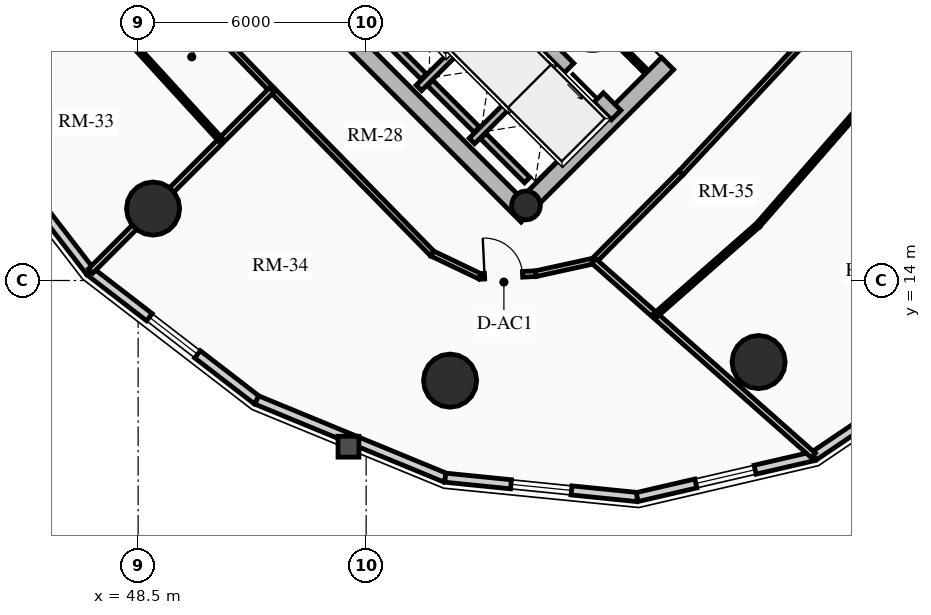
"""IFC4 building model, lengths in metres.
Left out: names, types, materials, properties, quantities, classifications, styles, units other than length and angle.
Written with IfcOpenShell. Run it as: python <this file> out.ifc"""

import sys

from ifc_helpers import new_model, si_unit, direction, frame, frame_2d, origin, origin_2d, place, context, subcontext, project, spatial, rectangle, circle, hollow_circle, extrude, source, transform, mapped, element, fill, save


model = new_model("IFC4")
c1 = context("Model", 3, precision=1e-05, world=origin(), true_north=direction((0.0, 1.0)))
c2 = subcontext(c1, "Body", "Model", "MODEL_VIEW")
j1 = project(units=[si_unit("LENGTHUNIT", "METRE"), si_unit("PLANEANGLEUNIT", "RADIAN")], contexts=[c1])
p1 = place(None, origin())
s1 = spatial("IfcSite", under=j1, at=p1, CompositionType="ELEMENT")
p2 = place(p1, origin())
s2 = spatial("IfcBuilding", under=s1, at=p2, CompositionType="ELEMENT")
p3 = place(p2, frame((0.0, 0.0, 144.04)))
s3 = spatial("IfcBuildingStorey", under=s2, at=p3, CompositionType="ELEMENT", Elevation=144.04)
p4 = place(p3, frame((58.737, 15.697, 0.0), z_axis=(0.0, 0.0, 1.0), x_axis=(-0.707106781187, 0.707106781187, 0.0)))
e1 = element("IfcWall", 1, at=p4, inside=s3, PredefinedType="SHEAR", context=c2, shape_type="SweptSolid", body=[
    extrude(rectangle(XDim=14.2, YDim=0.45, at=frame_2d((7.1, 0.0))), origin(), (0.0, 0.0, 1.0), 3.06),
])
p5 = place(p3, frame((58.578, 15.856, 0.0), z_axis=(0.0, 0.0, 1.0), x_axis=(0.707106781187, 0.707106781187, 0.0)))
e2 = element("IfcWall", 2, at=p5, inside=s3, PredefinedType="SHEAR", context=c2, shape_type="SweptSolid", body=[
    extrude(rectangle(XDim=10.7, YDim=0.45, at=frame_2d((5.35, 0.0))), origin(), (0.0, 0.0, 1.0), 3.06),
])
m1 = source(origin(), c2, "Body", "SweptSolid", [
    extrude(rectangle(XDim=1.5, YDim=2.02, at=frame_2d((0.75, 1.01))), frame((0.0, 0.235, 0.0), z_axis=(0.0, -1.0, 0.0), x_axis=(1.0, 0.0, 0.0)), (0.0, 0.0, 1.0), 0.47),
])
p6 = place(p5, frame((5.45, 0.0, 0.0)))
e3 = element("IfcOpeningElement", 3, at=p6, cuts=e2, PredefinedType="OPENING", context=c2, shape_type="MappedRepresentation", body=[
    mapped(m1, transform((0.0, 0.0, 0.0), x_axis=(1.0, 0.0, 0.0), y_axis=(0.0, 1.0, 0.0), z_axis=(0.0, 0.0, 1.0), scale=1.0)),
])
p7 = place(p3, frame((61.078, 18.355, 0.0), z_axis=(0.0, 0.0, 1.0), x_axis=(-0.707106781187, 0.707106781187, 0.0)))
e4 = element("IfcWall", 4, at=p7, inside=s3, PredefinedType="SHEAR", context=c2, shape_type="SweptSolid", body=[
    extrude(rectangle(XDim=13.75, YDim=0.35, at=frame_2d((6.875, 0.0))), origin(), (0.0, 0.0, 1.0), 3.06),
])
m2 = source(origin(), c2, "Body", "SweptSolid", [
    extrude(rectangle(XDim=1.1, YDim=2.015, at=frame_2d((0.55, 1.007))), frame((0.0, 0.185, 0.0), z_axis=(0.0, -1.0, 0.0), x_axis=(1.0, 0.0, 0.0)), (0.0, 0.0, 1.0), 0.37),
])
p8 = place(p7, frame((4.875, 0.0, 0.0)))
e5 = element("IfcOpeningElement", 5, at=p8, cuts=e4, PredefinedType="OPENING", context=c2, shape_type="MappedRepresentation", body=[
    mapped(m2, transform((0.0, 0.0, 0.0), x_axis=(1.0, 0.0, 0.0), y_axis=(0.0, 1.0, 0.0), z_axis=(0.0, 0.0, 1.0), scale=1.0)),
])
p9 = place(p7, frame((0.65, 0.0, 0.0)))
e6 = element("IfcOpeningElement", 6, at=p9, cuts=e4, PredefinedType="OPENING", context=c2, shape_type="MappedRepresentation", body=[
    mapped(m2, transform((0.0, 0.0, 0.0), x_axis=(1.0, 0.0, 0.0), y_axis=(0.0, 1.0, 0.0), z_axis=(0.0, 0.0, 1.0), scale=1.0)),
])
p10 = place(p7, frame((2.65, 0.0, 0.0)))
e7 = element("IfcOpeningElement", 7, at=p10, cuts=e4, PredefinedType="OPENING", context=c2, shape_type="MappedRepresentation", body=[
    mapped(m2, transform((0.0, 0.0, 0.0), x_axis=(1.0, 0.0, 0.0), y_axis=(0.0, 1.0, 0.0), z_axis=(0.0, 0.0, 1.0), scale=1.0)),
])
m3 = source(origin(), c2, "Body", "SweptSolid", [
    extrude(rectangle(XDim=1.15, YDim=2.02, at=frame_2d((0.575, 1.01))), frame((0.0, 0.185, 0.0), z_axis=(0.0, -1.0, 0.0), x_axis=(1.0, 0.0, 0.0)), (0.0, 0.0, 1.0), 0.37),
])
p11 = place(p7, frame((7.295, 0.0, 0.0)))
e8 = element("IfcOpeningElement", 8, at=p11, cuts=e4, PredefinedType="OPENING", context=c2, shape_type="MappedRepresentation", body=[
    mapped(m3, transform((0.0, 0.0, 0.0), x_axis=(1.0, 0.0, 0.0), y_axis=(0.0, 1.0, 0.0), z_axis=(0.0, 0.0, 1.0), scale=1.0)),
])
p12 = place(p3, frame((58.706, 15.976, 0.0), z_axis=(0.0, 0.0, 1.0), x_axis=(0.707106781187, 0.707106781187, 0.0)))
e9 = element("IfcColumn", 9, at=p12, inside=s3, PredefinedType="COLUMN", context=c2, shape_type="SweptSolid", body=[
    extrude(hollow_circle(Radius=0.38, WallThickness=0.032, at=origin_2d()), origin(), (0.0, 0.0, 1.0), 3.06),
])
for number, where, z_axis, x_axis in (
    (10, (48.893, 15.893, 0.0), (0.0, 0.0, 1.0), (1.0, 0.0, 0.0)),
    (11, (56.709, 11.365, 0.0), (0.0, 0.0, 1.0), (1.0, 0.0, 0.0)),
    (12, (64.827, 11.854, 0.0), (0.0, 0.0, 1.0), (1.0, 0.0, 0.0)),
):
    element("IfcColumn", number, at=place(p3, frame(where, z_axis=z_axis, x_axis=x_axis)), inside=s3, PredefinedType="USERDEFINED", context=c2, shape_type="SweptSolid", body=[
        extrude(circle(Radius=0.7, at=origin_2d()), origin(), (0.0, 0.0, 1.0), 3.06),
    ])
p13 = place(p3, frame((47.236, 14.236, 0.0), z_axis=(0.0, 0.0, 1.0), x_axis=(-0.610543584779, 0.791982658323, 0.0)))
e13 = element("IfcWall", 13, at=p13, inside=s3, PredefinedType="SOLIDWALL", context=c2, shape_type="SweptSolid", body=[
    extrude(rectangle(XDim=5.537, YDim=0.24, at=frame_2d((2.769, 0.0))), origin(), (0.0, 0.0, 1.0), 2.229),
])
p14 = place(p3, frame((51.622, 10.856, 0.0), z_axis=(0.0, 0.0, 1.0), x_axis=(-0.791982658323, 0.610543584779, 0.0)))
e14 = element("IfcWall", 14, at=p14, inside=s3, PredefinedType="SOLIDWALL", context=c2, shape_type="SweptSolid", body=[
    extrude(rectangle(XDim=5.537, YDim=0.24, at=frame_2d((2.769, 0.0))), origin(), (0.0, 0.0, 1.0), 2.229),
])
m4 = source(origin(), c2, "Body", "SweptSolid", [
    extrude(rectangle(XDim=1.6, YDim=1.3, at=frame_2d((0.8, 0.65))), frame((0.0, 0.13, 0.0), z_axis=(0.0, -1.0, 0.0), x_axis=(1.0, 0.0, 0.0)), (0.0, 0.0, 1.0), 0.26),
])
p15 = place(p14, frame((1.968, 0.0, 0.65)))
e15 = element("IfcOpeningElement", 15, at=p15, cuts=e14, PredefinedType="OPENING", context=c2, shape_type="MappedRepresentation", body=[
    mapped(m4, transform((0.0, 0.0, 0.0), x_axis=(1.0, 0.0, 0.0), y_axis=(0.0, 1.0, 0.0), z_axis=(0.0, 0.0, 1.0), scale=1.0)),
])
p16 = place(p3, frame((56.582, 8.811, 0.0), z_axis=(0.0, 0.0, 1.0), x_axis=(-0.924528197738, 0.38111364655, 0.0)))
e16 = element("IfcWall", 16, at=p16, inside=s3, PredefinedType="SOLIDWALL", context=c2, shape_type="SweptSolid", body=[
    extrude(rectangle(XDim=5.366, YDim=0.24, at=frame_2d((2.683, 0.0))), origin(), (0.0, 0.0, 1.0), 2.229),
])
p17 = place(p3, frame((61.633, 8.302, 0.0), z_axis=(0.0, 0.0, 1.0), x_axis=(-0.994959267396, 0.100279889424, 0.0)))
e17 = element("IfcWall", 17, at=p17, inside=s3, PredefinedType="SOLIDWALL", context=c2, shape_type="SweptSolid", body=[
    extrude(rectangle(XDim=5.076, YDim=0.24, at=frame_2d((2.538, 0.0))), origin(), (0.0, 0.0, 1.0), 2.229),
])
p18 = place(p17, frame((1.738, 0.0, 0.65)))
e18 = element("IfcOpeningElement", 18, at=p18, cuts=e17, PredefinedType="OPENING", context=c2, shape_type="MappedRepresentation", body=[
    mapped(m4, transform((0.0, 0.0, 0.0), x_axis=(1.0, 0.0, 0.0), y_axis=(0.0, 1.0, 0.0), z_axis=(0.0, 0.0, 1.0), scale=1.0)),
])
p19 = place(p3, frame((66.279, 9.378, 0.0), z_axis=(0.0, 0.0, 1.0), x_axis=(-0.974206226622, -0.225659540039, 0.0)))
e19 = element("IfcWall", 19, at=p19, inside=s3, PredefinedType="SOLIDWALL", context=c2, shape_type="SweptSolid", body=[
    extrude(rectangle(XDim=4.769, YDim=0.24, at=frame_2d((2.385, 0.0))), origin(), (0.0, 0.0, 1.0), 2.229),
])
p20 = place(p19, frame((1.585, 0.0, 0.65)))
e20 = element("IfcOpeningElement", 20, at=p20, cuts=e19, PredefinedType="OPENING", context=c2, shape_type="MappedRepresentation", body=[
    mapped(m4, transform((0.0, 0.0, 0.0), x_axis=(1.0, 0.0, 0.0), y_axis=(0.0, 1.0, 0.0), z_axis=(0.0, 0.0, 1.0), scale=1.0)),
])
p21 = place(p3, frame((70.065, 11.935, 0.0), z_axis=(0.0, 0.0, 1.0), x_axis=(-0.828739009952, -0.559635286042, 0.0)))
e21 = element("IfcWall", 21, at=p21, inside=s3, PredefinedType="SOLIDWALL", context=c2, shape_type="SweptSolid", body=[
    extrude(rectangle(XDim=4.569, YDim=0.24, at=frame_2d((2.284, 0.0))), origin(), (0.0, 0.0, 1.0), 2.229),
])
p22 = place(p3, frame((55.888, 19.069, 0.0), z_axis=(0.0, 0.0, 1.0), x_axis=(0.707106781187, 0.707106781187, 0.0)))
e22 = element("IfcWall", 22, at=p22, inside=s3, PredefinedType="SHEAR", context=c2, shape_type="SweptSolid", body=[
    extrude(rectangle(XDim=2.97, YDim=0.2, at=frame_2d((1.485, 0.0))), origin(), (0.0, 0.0, 1.0), 3.06),
])
p23 = place(p3, frame((56.015, 19.366, 0.0), z_axis=(0.0, 0.0, 1.0), x_axis=(-0.707106781187, 0.707106781187, 0.0)))
e23 = element("IfcWall", 23, at=p23, inside=s3, PredefinedType="SHEAR", context=c2, shape_type="SweptSolid", body=[
    extrude(rectangle(XDim=2.44, YDim=0.2, at=frame_2d((1.22, 0.0))), origin(), (0.0, 0.0, 1.0), 3.06),
])
p24 = place(p3, frame((57.284, 17.673, 0.0), z_axis=(0.0, 0.0, 1.0), x_axis=(0.707147878904, 0.70706568108, 0.0)))
e24 = element("IfcWall", 24, at=p24, inside=s3, PredefinedType="SHEAR", context=c2, shape_type="SweptSolid", body=[
    extrude(rectangle(XDim=2.97, YDim=0.2, at=frame_2d((1.485, 0.0))), origin(), (0.0, 0.0, 1.0), 3.06),
])
p25 = place(p3, frame((57.412, 17.97, 0.0), z_axis=(0.0, 0.0, 1.0), x_axis=(-0.707106781187, 0.707106781187, 0.0)))
e25 = element("IfcWall", 25, at=p25, inside=s3, PredefinedType="SHEAR", context=c2, shape_type="SweptSolid", body=[
    extrude(rectangle(XDim=1.735, YDim=0.2, at=frame_2d((0.867, 0.0))), origin(), (0.0, 0.0, 1.0), 3.06),
])
p26 = place(p3, frame((58.737, 16.644, 0.0), z_axis=(0.0, 0.0, 1.0), x_axis=(-0.707032117043, 0.707181437447, 0.0)))
e26 = element("IfcWall", 26, at=p26, inside=s3, PredefinedType="SHEAR", context=c2, shape_type="SweptSolid", body=[
    extrude(rectangle(XDim=1.635, YDim=0.2, at=frame_2d((0.817, 0.0))), origin(), (0.0, 0.0, 1.0), 3.06),
])
p27 = place(p3, frame((61.835, 19.529, 0.0), z_axis=(0.0, 0.0, 1.0), x_axis=(-0.707146413884, 0.707067146267, 0.0)))
e27 = element("IfcWall", 27, at=p27, inside=s3, PredefinedType="PARTITIONING", context=c2, shape_type="SweptSolid", body=[
    extrude(rectangle(XDim=3.08, YDim=0.125, at=frame_2d((1.54, 0.0))), origin(), (0.0, 0.0, 1.0), 2.705),
])
m5 = source(origin(), c2, "Body", "SweptSolid", [
    extrude(rectangle(XDim=0.9, YDim=2.005, at=frame_2d((0.45, 1.002))), frame((0.0, 0.073, 0.0), z_axis=(0.0, -1.0, 0.0), x_axis=(1.0, 0.0, 0.0)), (0.0, 0.0, 1.0), 0.145),
])
p28 = place(p27, frame((1.05, 0.0, 0.0)))
e28 = element("IfcOpeningElement", 28, at=p28, cuts=e27, PredefinedType="OPENING", context=c2, shape_type="MappedRepresentation", body=[
    mapped(m5, transform((0.0, 0.0, 0.0), x_axis=(1.0, 0.0, 0.0), y_axis=(0.0, 1.0, 0.0), z_axis=(0.0, 0.0, 1.0), scale=1.0)),
])
p29 = place(p3, frame((47.901, 23.265, 0.0), z_axis=(0.0, 0.0, 1.0), x_axis=(0.696355965374, -0.717696572019, 0.0)))
e29 = element("IfcWall", 29, at=p29, inside=s3, PredefinedType="PARTITIONING", context=c2, shape_type="SweptSolid", body=[
    extrude(rectangle(XDim=5.915, YDim=0.15, at=frame_2d((2.957, 0.0))), origin(), (0.0, 0.0, 1.0), 2.705),
])
p30 = place(p3, frame((52.02, 19.02, 0.0), z_axis=(0.0, 0.0, 1.0), x_axis=(0.699456449804, -0.71467522332, 0.0)))
e30 = element("IfcWall", 30, at=p30, inside=s3, PredefinedType="PARTITIONING", context=c2, shape_type="SweptSolid", body=[
    extrude(rectangle(XDim=6.032, YDim=0.15, at=frame_2d((3.016, 0.0))), origin(), (0.0, 0.0, 1.0), 2.275),
])
p31 = place(p3, frame((56.239, 14.709, 0.0), z_axis=(0.0, 0.0, 1.0), x_axis=(0.902374219125, -0.430953325383, 0.0)))
e31 = element("IfcWall", 31, at=p31, inside=s3, PredefinedType="PARTITIONING", context=c2, shape_type="SweptSolid", body=[
    extrude(rectangle(XDim=1.394, YDim=0.15, at=frame_2d((0.697, 0.0))), origin(), (0.0, 0.0, 1.0), 2.275),
])
p32 = place(p3, frame((57.497, 14.109, 0.0), z_axis=(0.0, 0.0, 1.0), x_axis=(0.998828286318, 0.048394777109, 0.0)))
e32 = element("IfcWall", 32, at=p32, inside=s3, PredefinedType="PARTITIONING", context=c2, shape_type="SweptSolid", body=[
    extrude(rectangle(XDim=1.468, YDim=0.15, at=frame_2d((0.734, 0.0))), origin(), (0.0, 0.0, 1.0), 2.275),
])
m6 = source(origin(), c2, "Body", "SweptSolid", [
    extrude(rectangle(XDim=1.0, YDim=2.015, at=frame_2d((0.5, 1.007))), frame((0.0, 0.085, 0.0), z_axis=(0.0, -1.0, 0.0), x_axis=(1.0, 0.0, 0.0)), (0.0, 0.0, 1.0), 0.17),
])
p33 = place(p32, frame((0.12, 0.0, 0.0)))
e33 = element("IfcOpeningElement", 33, at=p33, cuts=e32, PredefinedType="OPENING", context=c2, shape_type="MappedRepresentation", body=[
    mapped(m6, transform((0.0, 0.0, 0.0), x_axis=(1.0, 0.0, 0.0), y_axis=(0.0, 1.0, 0.0), z_axis=(0.0, 0.0, 1.0), scale=1.0)),
])
p34 = place(p3, frame((58.963, 14.18, 0.0), z_axis=(0.0, 0.0, 1.0), x_axis=(0.976826524015, 0.214032572243, 0.0)))
e34 = element("IfcWall", 34, at=p34, inside=s3, PredefinedType="PARTITIONING", context=c2, shape_type="SweptSolid", body=[
    extrude(rectangle(XDim=1.562, YDim=0.15, at=frame_2d((0.781, 0.0))), origin(), (0.0, 0.0, 1.0), 2.275),
])
p35 = place(p3, frame((60.488, 14.514, 0.0), z_axis=(0.0, 0.0, 1.0), x_axis=(0.703880260405, 0.71031864611, 0.0)))
e35 = element("IfcWall", 35, at=p35, inside=s3, PredefinedType="PARTITIONING", context=c2, shape_type="SweptSolid", body=[
    extrude(rectangle(XDim=3.261, YDim=0.15, at=frame_2d((1.63, 0.0))), origin(), (0.0, 0.0, 1.0), 2.275),
])
p36 = place(p3, frame((62.784, 16.83, 0.0), z_axis=(0.0, 0.0, 1.0), x_axis=(0.682240832942, 0.731127516831, 0.0)))
e36 = element("IfcWall", 36, at=p36, inside=s3, PredefinedType="PARTITIONING", context=c2, shape_type="SweptSolid", body=[
    extrude(rectangle(XDim=6.517, YDim=0.15, at=frame_2d((3.259, 0.0))), origin(), (0.0, 0.0, 1.0), 2.275),
])
p37 = place(p3, frame((52.02, 19.02, 0.0), z_axis=(0.0, 0.0, 1.0), x_axis=(-0.707106781187, -0.707106781187, 0.0)))
e37 = element("IfcWall", 37, at=p37, inside=s3, PredefinedType="PARTITIONING", context=c2, shape_type="SweptSolid", body=[
    extrude(rectangle(XDim=6.745, YDim=0.16, at=frame_2d((3.373, 0.0))), origin(), (0.0, 0.0, 1.0), 2.229),
])
p38 = place(p3, frame((60.488, 14.514, 0.0), z_axis=(0.0, 0.0, 1.0), x_axis=(0.748740614849, -0.662863101761, 0.0)))
e38 = element("IfcWall", 38, at=p38, inside=s3, PredefinedType="PARTITIONING", context=c2, shape_type="SweptSolid", body=[
    extrude(rectangle(XDim=7.721, YDim=0.16, at=frame_2d((3.861, 0.0))), origin(), (0.0, 0.0, 1.0), 2.229),
])
p39 = place(p3, frame((46.774, 21.967, 0.0), z_axis=(0.0, 0.0, 1.0), x_axis=(0.674324259609, -0.738435368129, 0.0)))
e39 = element("IfcWall", 39, at=p39, inside=s3, PredefinedType="PARTITIONING", context=c2, shape_type="SweptSolid", body=[
    extrude(rectangle(XDim=5.8, YDim=0.125, at=frame_2d((2.9, 0.0))), origin(), (0.0, 0.0, 1.0), 2.705),
])
p40 = place(p3, frame((62.107, 13.081, 0.0), z_axis=(0.0, 0.0, 1.0), x_axis=(0.751158800718, 0.660121546462, 0.0)))
e40 = element("IfcWall", 40, at=p40, inside=s3, PredefinedType="PARTITIONING", context=c2, shape_type="SweptSolid", body=[
    extrude(rectangle(XDim=3.61, YDim=0.125, at=frame_2d((1.805, 0.0))), origin(), (0.0, 0.0, 1.0), 2.275),
])
p41 = place(p3, frame((64.819, 15.464, 0.0), z_axis=(0.0, 0.0, 1.0), x_axis=(0.657357859075, 0.75357855935, 0.0)))
e41 = element("IfcWall", 41, at=p41, inside=s3, PredefinedType="PARTITIONING", context=c2, shape_type="SweptSolid", body=[
    extrude(rectangle(XDim=5.958, YDim=0.125, at=frame_2d((2.979, 0.0))), origin(), (0.0, 0.0, 1.0), 2.275),
])
m7 = source(origin(), c2, "Body", "SweptSolid", [
    extrude(rectangle(XDim=1.6, YDim=1.3, at=frame_2d((0.8, 0.65))), frame((0.0, 0.03, 0.0), z_axis=(0.0, -1.0, 0.0), x_axis=(1.0, 0.0, 0.0)), (0.0, 0.0, 1.0), 0.06),
])
p42 = place(p15, origin())
e42 = element("IfcWindow", 42, at=p42, inside=s3, PartitioningType="SINGLE_PANEL", PredefinedType="WINDOW", context=c2, shape_type="MappedRepresentation", body=[
    mapped(m7, transform((0.0, 0.0, 0.0), x_axis=(1.0, 0.0, 0.0), y_axis=(0.0, 1.0, 0.0), z_axis=(0.0, 0.0, 1.0), scale=1.0)),
])
fill(e15, e42)
p43 = place(p18, origin())
e43 = element("IfcWindow", 43, at=p43, inside=s3, PartitioningType="SINGLE_PANEL", PredefinedType="WINDOW", context=c2, shape_type="MappedRepresentation", body=[
    mapped(m7, transform((0.0, 0.0, 0.0), x_axis=(1.0, 0.0, 0.0), y_axis=(0.0, 1.0, 0.0), z_axis=(0.0, 0.0, 1.0), scale=1.0)),
])
fill(e18, e43)
p44 = place(p20, origin())
e44 = element("IfcWindow", 44, at=p44, inside=s3, PartitioningType="SINGLE_PANEL", PredefinedType="WINDOW", context=c2, shape_type="MappedRepresentation", body=[
    mapped(m7, transform((0.0, 0.0, 0.0), x_axis=(1.0, 0.0, 0.0), y_axis=(0.0, 1.0, 0.0), z_axis=(0.0, 0.0, 1.0), scale=1.0)),
])
fill(e20, e44)
m8 = source(origin(), c2, "Body", "SweptSolid", [
    extrude(rectangle(XDim=1.1, YDim=2.015, at=frame_2d((0.55, 1.007))), frame((0.0, 0.025, 0.0), z_axis=(0.0, -1.0, 0.0), x_axis=(1.0, 0.0, 0.0)), (0.0, 0.0, 1.0), 0.05),
])
p45 = place(p9, origin())
e45 = element("IfcDoor", 45, at=p45, inside=s3, OperationType="SLIDING_TO_LEFT", PredefinedType="DOOR", context=c2, shape_type="MappedRepresentation", body=[
    mapped(m8, transform((0.0, 0.0, 0.0), x_axis=(1.0, 0.0, 0.0), y_axis=(0.0, 1.0, 0.0), z_axis=(0.0, 0.0, 1.0), scale=1.0)),
])
fill(e6, e45)
m9 = source(origin(), c2, "Body", "SweptSolid", [
    extrude(rectangle(XDim=1.5, YDim=2.02, at=frame_2d((0.75, 1.01))), frame((0.0, 0.025, 0.0), z_axis=(0.0, -1.0, 0.0), x_axis=(1.0, 0.0, 0.0)), (0.0, 0.0, 1.0), 0.05),
])
p46 = place(p6, origin())
e46 = element("IfcDoor", 46, at=p46, inside=s3, OperationType="DOUBLE_DOOR_SINGLE_SWING", PredefinedType="DOOR", context=c2, shape_type="MappedRepresentation", body=[
    mapped(m9, transform((0.0, 0.0, 0.0), x_axis=(1.0, 0.0, 0.0), y_axis=(0.0, 1.0, 0.0), z_axis=(0.0, 0.0, 1.0), scale=1.0)),
])
fill(e3, e46)
m10 = source(origin(), c2, "Body", "SweptSolid", [
    extrude(rectangle(XDim=1.0, YDim=2.015, at=frame_2d((0.5, 1.007))), frame((0.0, 0.025, 0.0), z_axis=(0.0, -1.0, 0.0), x_axis=(1.0, 0.0, 0.0)), (0.0, 0.0, 1.0), 0.05),
])
p47 = place(p33, origin())
e47 = element("IfcDoor", 47, at=p47, inside=s3, OperationType="SINGLE_SWING_LEFT", PredefinedType="DOOR", context=c2, shape_type="MappedRepresentation", body=[
    mapped(m10, transform((0.0, 0.0, 0.0), x_axis=(1.0, 0.0, 0.0), y_axis=(0.0, 1.0, 0.0), z_axis=(0.0, 0.0, 1.0), scale=1.0)),
])
fill(e33, e47)
save(model, sys.argv[1])
